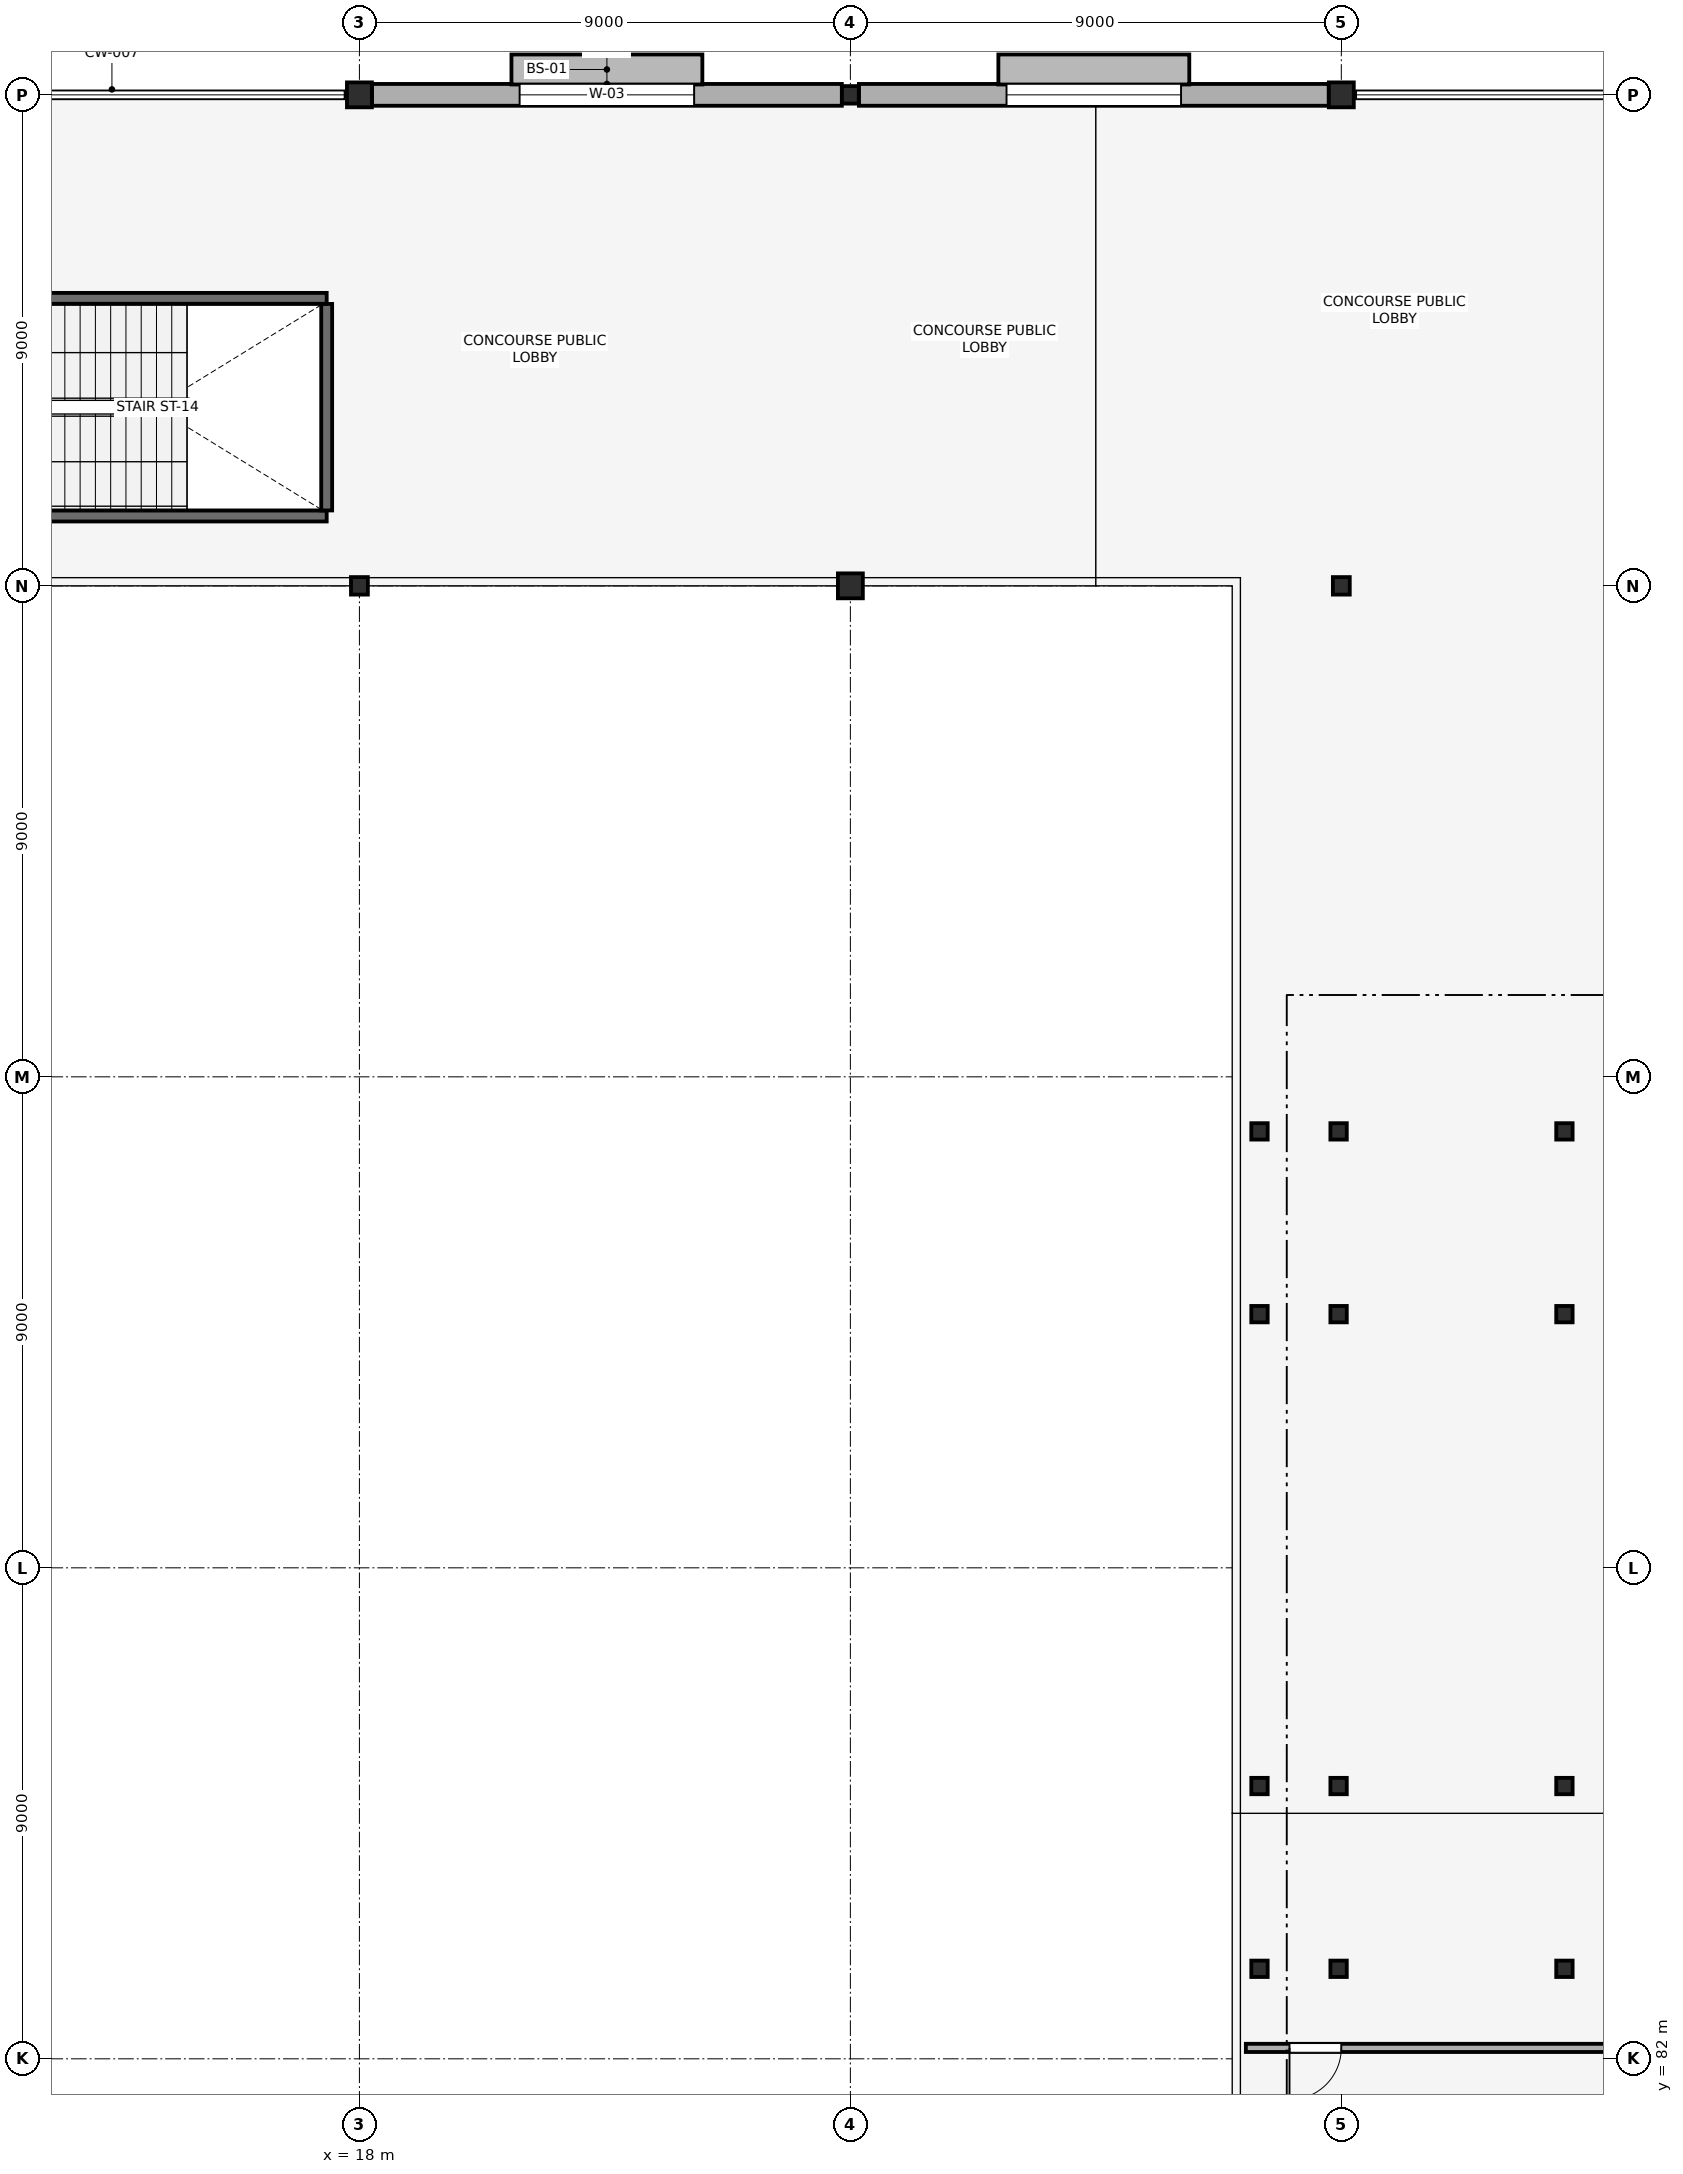
"""IFC4 building model, lengths in metres.
Left out: names, types, materials, properties, quantities, classifications, styles, units other than length and angle.
Written with IfcOpenShell. Run it as: python <this file> out.ifc"""

import sys

from ifc_helpers import new_model, si_unit, direction, frame, frame_2d, origin, origin_2d, place, context, subcontext, project, spatial, rectangle, hollow_rectangle, hollow_circle, i_section, extrude, element, fill, save


model = new_model("IFC4")
c1 = context("Model", 3, precision=1e-05, world=origin(), true_north=direction((0.0, 1.0)))
c2 = subcontext(c1, "Body", "Model", "MODEL_VIEW")
j1 = project(units=[si_unit("LENGTHUNIT", "METRE"), si_unit("PLANEANGLEUNIT", "RADIAN")], contexts=[c1])
p1 = place(None, origin())
s1 = spatial("IfcSite", under=j1, at=p1, CompositionType="ELEMENT")
p2 = place(p1, origin())
s2 = spatial("IfcBuilding", under=s1, at=p2, CompositionType="ELEMENT")
p3 = place(p2, frame((0.0, 0.0, 5.4)))
s3 = spatial("IfcBuildingStorey", under=s2, at=p3, CompositionType="ELEMENT", Elevation=5.4)
p4 = place(p3, frame((18.0, 109.0, 0.0), z_axis=(0.0, 0.0, 1.0), x_axis=(1.0, 0.0, 0.0)))
e1 = element("IfcColumn", 1, at=p4, inside=s3, PredefinedType="COLUMN", context=c2, shape_type="SweptSolid", body=[
    extrude(i_section(OverallWidth=0.309, OverallDepth=0.321, WebThickness=0.014, FlangeThickness=0.022, FilletRadius=0.015, at=origin_2d()), origin(), (0.0, 0.0, 1.0), 4.8),
])
for number, where, z_axis, x_axis in (
    (2, (18.0, 118.0, 0.0), (0.0, 0.0, 1.0), (1.0, 0.0, 0.0)),
    (3, (27.0, 109.0, 0.0), (0.0, 0.0, 1.0), (1.0, 0.0, 0.0)),
):
    element("IfcColumn", number, at=place(p3, frame(where, z_axis=z_axis, x_axis=x_axis)), inside=s3, PredefinedType="COLUMN", context=c2, shape_type="SweptSolid", body=[
        extrude(hollow_circle(Radius=0.229, WallThickness=0.02, at=origin_2d()), origin(), (0.0, 0.0, 1.0), 4.8),
    ])
for number, where, z_axis, x_axis in (
    (4, (27.0, 118.0, 0.0), (0.0, 0.0, 1.0), (1.0, 0.0, 0.0)),
    (5, (36.0, 109.0, 0.0), (0.0, 0.0, 1.0), (1.0, 0.0, 0.0)),
):
    element("IfcColumn", number, at=place(p3, frame(where, z_axis=z_axis, x_axis=x_axis)), inside=s3, PredefinedType="COLUMN", context=c2, shape_type="SweptSolid", body=[
        extrude(i_section(OverallWidth=0.309, OverallDepth=0.321, WebThickness=0.014, FlangeThickness=0.022, FilletRadius=0.015, at=origin_2d()), origin(), (0.0, 0.0, 1.0), 4.8),
    ])
p5 = place(p3, frame((36.0, 118.0, 0.0), z_axis=(0.0, 0.0, 1.0), x_axis=(1.0, 0.0, 0.0)))
e6 = element("IfcColumn", 6, at=p5, inside=s3, PredefinedType="COLUMN", context=c2, shape_type="SweptSolid", body=[
    extrude(hollow_circle(Radius=0.229, WallThickness=0.02, at=origin_2d()), origin(), (0.0, 0.0, 1.0), 4.8),
])
p6 = place(p3, frame((18.23, 118.0, 0.0), z_axis=(0.0, 0.0, 1.0), x_axis=(1.0, 0.0, 0.0)))
e7 = element("IfcWall", 7, at=p6, inside=s3, PredefinedType="STANDARD", context=c2, shape_type="SweptSolid", body=[
    extrude(rectangle(XDim=8.613, YDim=0.4, at=frame_2d((4.307, 0.0))), origin(), (0.0, 0.0, 1.0), 3.907),
])
p7 = place(p6, frame((2.706, 0.0, 0.95)))
e8 = element("IfcOpeningElement", 8, at=p7, cuts=e7, PredefinedType="OPENING", context=c2, shape_type="SweptSolid", body=[
    extrude(rectangle(XDim=3.2, YDim=1.8, at=frame_2d((1.6, 0.9))), frame((0.0, 0.21, 0.0), z_axis=(0.0, -1.0, 0.0), x_axis=(1.0, 0.0, 0.0)), (0.0, 0.0, 1.0), 0.42),
])
p8 = place(p3, frame((27.156, 118.0, 0.0), z_axis=(0.0, 0.0, 1.0), x_axis=(1.0, 0.0, 0.0)))
e9 = element("IfcWall", 9, at=p8, inside=s3, PredefinedType="STANDARD", context=c2, shape_type="SweptSolid", body=[
    extrude(rectangle(XDim=8.613, YDim=0.4, at=frame_2d((4.307, 0.0))), origin(), (0.0, 0.0, 1.0), 3.907),
])
p9 = place(p8, frame((2.706, 0.0, 0.95)))
e10 = element("IfcOpeningElement", 10, at=p9, cuts=e9, PredefinedType="OPENING", context=c2, shape_type="SweptSolid", body=[
    extrude(rectangle(XDim=3.2, YDim=1.8, at=frame_2d((1.6, 0.9))), frame((0.0, 0.21, 0.0), z_axis=(0.0, -1.0, 0.0), x_axis=(1.0, 0.0, 0.0)), (0.0, 0.0, 1.0), 0.42),
])
p10 = place(p3, frame((9.45, 110.28, 0.0), z_axis=(0.0, 0.0, 1.0), x_axis=(1.0, 0.0, 0.0)))
e11 = element("IfcWall", 11, at=p10, inside=s3, PredefinedType="SHEAR", context=c2, shape_type="SweptSolid", body=[
    extrude(rectangle(XDim=7.95, YDim=0.2, at=frame_2d((3.975, 0.0))), origin(), (0.0, 0.0, 1.0), 4.8),
])
p11 = place(p3, frame((17.4, 110.382, 0.0), z_axis=(0.0, 0.0, 1.0), x_axis=(0.0, 1.0, 0.0)))
e12 = element("IfcWall", 12, at=p11, inside=s3, PredefinedType="SHEAR", context=c2, shape_type="SweptSolid", body=[
    extrude(rectangle(XDim=3.786, YDim=0.2, at=frame_2d((1.893, 0.0))), origin(), (0.0, 0.0, 1.0), 4.8),
])
p12 = place(p3, frame((9.45, 114.27, 0.0), z_axis=(0.0, 0.0, 1.0), x_axis=(1.0, 0.0, 0.0)))
e13 = element("IfcWall", 13, at=p12, inside=s3, PredefinedType="SHEAR", context=c2, shape_type="SweptSolid", body=[
    extrude(rectangle(XDim=7.95, YDim=0.2, at=frame_2d((3.975, 0.0))), origin(), (0.0, 0.0, 1.0), 4.8),
])
for number, where, z_axis, x_axis in (
    (14, (34.5, 95.65, 0.0), (0.0, 0.0, 1.0), (1.0, 0.0, 0.0)),
    (15, (34.5, 99.0, 0.0), (0.0, 0.0, 1.0), (1.0, 0.0, 0.0)),
    (16, (35.95, 95.65, 0.0), (0.0, 0.0, 1.0), (1.0, 0.0, 0.0)),
    (17, (35.95, 99.0, 0.0), (0.0, 0.0, 1.0), (1.0, 0.0, 0.0)),
    (18, (40.09, 95.65, 0.0), (0.0, 0.0, 1.0), (1.0, 0.0, 0.0)),
    (19, (40.09, 99.0, 0.0), (0.0, 0.0, 1.0), (1.0, 0.0, 0.0)),
    (20, (34.5, 83.65, 0.0), (0.0, 0.0, 1.0), (1.0, 0.0, 0.0)),
    (21, (34.5, 87.0, 0.0), (0.0, 0.0, 1.0), (1.0, 0.0, 0.0)),
    (22, (35.95, 83.65, 0.0), (0.0, 0.0, 1.0), (1.0, 0.0, 0.0)),
    (23, (35.95, 87.0, 0.0), (0.0, 0.0, 1.0), (1.0, 0.0, 0.0)),
    (24, (40.09, 83.65, 0.0), (0.0, 0.0, 1.0), (1.0, 0.0, 0.0)),
    (25, (40.09, 87.0, 0.0), (0.0, 0.0, 1.0), (1.0, 0.0, 0.0)),
):
    element("IfcColumn", number, at=place(p3, frame(where, z_axis=z_axis, x_axis=x_axis)), inside=s3, PredefinedType="COLUMN", context=c2, shape_type="SweptSolid", body=[
        extrude(hollow_rectangle(XDim=0.3, YDim=0.3, WallThickness=0.012, at=origin_2d()), origin(), (0.0, 0.0, 1.0), 4.8),
    ])
p13 = place(p3, frame((41.0, 82.2, 0.0), z_axis=(0.0, 0.0, 1.0), x_axis=(-1.0, 0.0, 0.0)))
e26 = element("IfcWall", 26, at=p13, inside=s3, PredefinedType="PARTITIONING", context=c2, shape_type="SweptSolid", body=[
    extrude(rectangle(XDim=6.75, YDim=0.15, at=frame_2d((3.375, 0.0))), origin(), (0.0, 0.0, 1.0), 4.52),
])
p14 = place(p13, frame((5.0, 0.0, 0.0)))
e27 = element("IfcOpeningElement", 27, at=p14, cuts=e26, PredefinedType="OPENING", context=c2, shape_type="SweptSolid", body=[
    extrude(rectangle(XDim=0.95, YDim=2.1, at=frame_2d((0.475, 1.05))), frame((0.0, 0.085, 0.0), z_axis=(0.0, -1.0, 0.0), x_axis=(1.0, 0.0, 0.0)), (0.0, 0.0, 1.0), 0.17),
])
p15 = place(p7, origin())
e28 = element("IfcWindow", 28, at=p15, inside=s3, PartitioningType="SINGLE_PANEL", PredefinedType="WINDOW", context=c2, shape_type="SweptSolid", body=[
    extrude(rectangle(XDim=3.2, YDim=1.8, at=frame_2d((1.6, 0.9))), frame((0.0, 0.03, 0.0), z_axis=(0.0, -1.0, 0.0), x_axis=(1.0, 0.0, 0.0)), (0.0, 0.0, 1.0), 0.06),
])
fill(e8, e28)
p16 = place(p9, origin())
e29 = element("IfcWindow", 29, at=p16, inside=s3, PartitioningType="SINGLE_PANEL", PredefinedType="WINDOW", context=c2, shape_type="SweptSolid", body=[
    extrude(rectangle(XDim=3.2, YDim=1.8, at=frame_2d((1.6, 0.9))), frame((0.0, 0.03, 0.0), z_axis=(0.0, -1.0, 0.0), x_axis=(1.0, 0.0, 0.0)), (0.0, 0.0, 1.0), 0.06),
])
fill(e10, e29)
p17 = place(p14, origin())
e30 = element("IfcDoor", 30, at=p17, inside=s3, OperationType="SINGLE_SWING_RIGHT", PredefinedType="DOOR", context=c2, shape_type="SweptSolid", body=[
    extrude(rectangle(XDim=0.95, YDim=2.1, at=frame_2d((0.475, 1.05))), frame((0.0, 0.025, 0.0), z_axis=(0.0, -1.0, 0.0), x_axis=(1.0, 0.0, 0.0)), (0.0, 0.0, 1.0), 0.05),
])
fill(e27, e30)
save(model, sys.argv[1])
